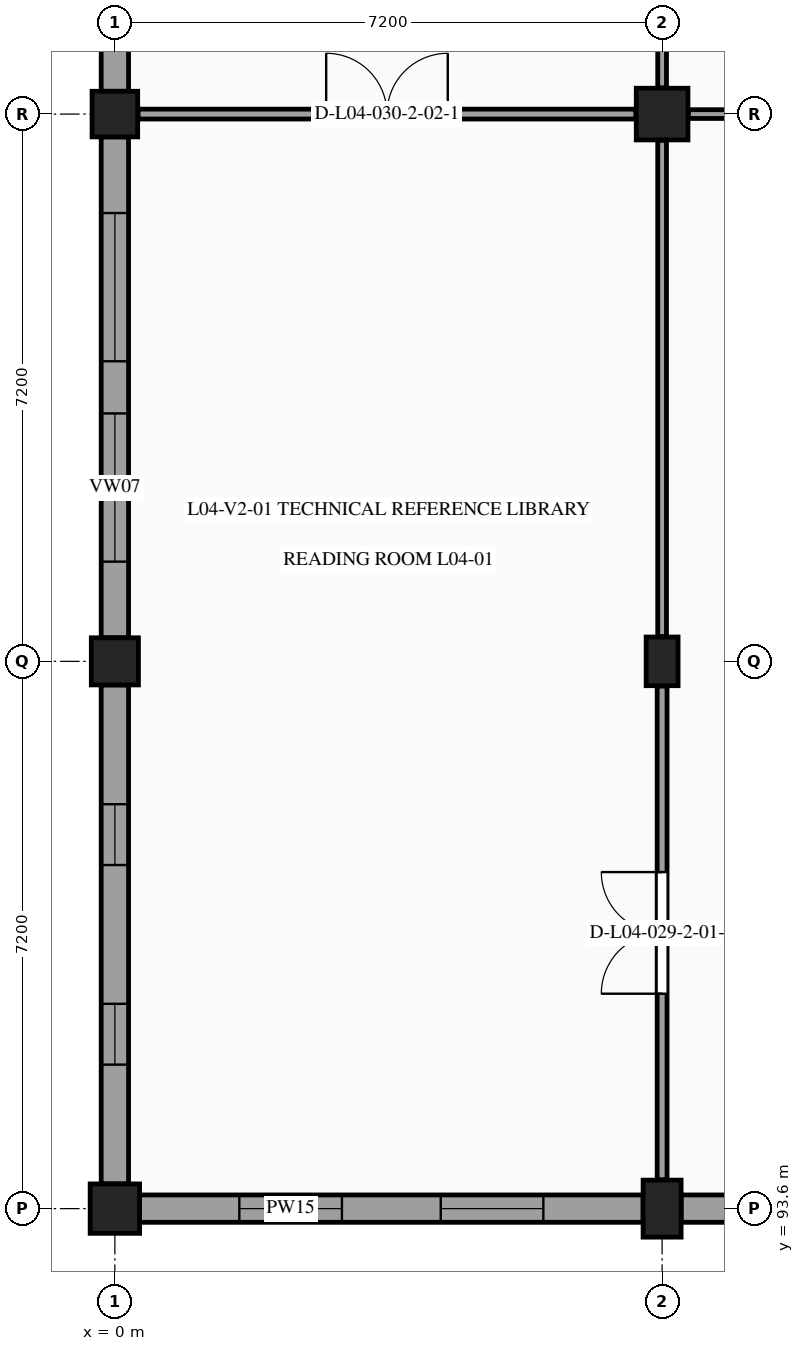
"""IFC4 building model, lengths in metres.
Left out: names, types, materials, properties, quantities, classifications, styles, units other than length and angle.
Written with IfcOpenShell. Run it as: python <this file> out.ifc"""

import sys

from ifc_helpers import new_model, si_unit, direction, frame, frame_2d, origin, origin_2d, place, context, subcontext, project, spatial, rectangle, extrude, element, fill, save


model = new_model("IFC4")
c1 = context("Model", 3, precision=1e-05, world=origin(), true_north=direction((0.0, 1.0)))
c2 = subcontext(c1, "Body", "Model", "MODEL_VIEW")
j1 = project(units=[si_unit("LENGTHUNIT", "METRE"), si_unit("PLANEANGLEUNIT", "RADIAN")], contexts=[c1])
p1 = place(None, origin())
s1 = spatial("IfcSite", under=j1, at=p1, CompositionType="ELEMENT")
p2 = place(p1, origin())
s2 = spatial("IfcBuilding", under=s1, at=p2, CompositionType="ELEMENT")
p3 = place(p2, frame((0.0, 0.0, 18.6)))
s3 = spatial("IfcBuildingStorey", under=s2, at=p3, CompositionType="ELEMENT", Elevation=18.6)
p4 = place(p3, frame((0.0, 93.6, 0.0), z_axis=(0.0, 0.0, 1.0), x_axis=(1.0, 0.0, 0.0)))
e1 = element("IfcColumn", 1, at=p4, inside=s3, PredefinedType="COLUMN", context=c2, shape_type="SweptSolid", body=[
    extrude(rectangle(XDim=0.65, YDim=0.65, at=origin_2d()), origin(), (0.0, 0.0, 1.0), 4.2),
])
p5 = place(p3, frame((0.0, 100.8, 0.0), z_axis=(0.0, 0.0, 1.0), x_axis=(1.0, 0.0, 0.0)))
e2 = element("IfcColumn", 2, at=p5, inside=s3, PredefinedType="COLUMN", context=c2, shape_type="SweptSolid", body=[
    extrude(rectangle(XDim=0.62, YDim=0.62, at=origin_2d()), origin(), (0.0, 0.0, 1.0), 4.2),
])
p6 = place(p3, frame((0.0, 108.0, 0.0), z_axis=(0.0, 0.0, 1.0), x_axis=(1.0, 0.0, 0.0)))
e3 = element("IfcColumn", 3, at=p6, inside=s3, PredefinedType="COLUMN", context=c2, shape_type="SweptSolid", body=[
    extrude(rectangle(XDim=0.6, YDim=0.6, at=origin_2d()), origin(), (0.0, 0.0, 1.0), 4.2),
])
p7 = place(p3, frame((7.2, 93.6, 0.0), z_axis=(0.0, 0.0, 1.0), x_axis=(1.0, 0.0, 0.0)))
e4 = element("IfcColumn", 4, at=p7, inside=s3, PredefinedType="COLUMN", context=c2, shape_type="SweptSolid", body=[
    extrude(rectangle(XDim=0.5, YDim=0.75, at=origin_2d()), origin(), (0.0, 0.0, 1.0), 4.2),
])
p8 = place(p3, frame((7.2, 100.8, 0.0), z_axis=(0.0, 0.0, 1.0), x_axis=(1.0, 0.0, 0.0)))
e5 = element("IfcColumn", 5, at=p8, inside=s3, PredefinedType="PILASTER", context=c2, shape_type="SweptSolid", body=[
    extrude(rectangle(XDim=0.42, YDim=0.64, at=origin_2d()), origin(), (0.0, 0.0, 1.0), 4.2),
])
p9 = place(p3, frame((7.2, 108.0, 0.0), z_axis=(0.0, 0.0, 1.0), x_axis=(1.0, 0.0, 0.0)))
e6 = element("IfcColumn", 6, at=p9, inside=s3, PredefinedType="COLUMN", context=c2, shape_type="SweptSolid", body=[
    extrude(rectangle(XDim=0.68, YDim=0.68, at=origin_2d()), origin(), (0.0, 0.0, 1.0), 4.2),
])
p10 = place(p3, frame((14.075, 93.6, 0.0), z_axis=(0.0, 0.0, 1.0), x_axis=(-1.0, 0.0, 0.0)))
e7 = element("IfcWall", 7, at=p10, inside=s3, PredefinedType="STANDARD", context=c2, shape_type="SweptSolid", body=[
    extrude(rectangle(XDim=6.625, YDim=0.36, at=frame_2d((3.312, 0.0))), origin(), (0.0, 0.0, 1.0), 3.2),
])
p11 = place(p10, frame((1.238, 0.0, 1.15)))
e8 = element("IfcOpeningElement", 8, at=p11, cuts=e7, PredefinedType="OPENING", context=c2, shape_type="SweptSolid", body=[
    extrude(rectangle(XDim=1.5, YDim=1.2, at=frame_2d((0.75, 0.6))), frame((0.0, 0.19, 0.0), z_axis=(0.0, -1.0, 0.0), x_axis=(1.0, 0.0, 0.0)), (0.0, 0.0, 1.0), 0.38),
])
p12 = place(p10, frame((3.887, 0.0, 1.15)))
e9 = element("IfcOpeningElement", 9, at=p12, cuts=e7, PredefinedType="OPENING", context=c2, shape_type="SweptSolid", body=[
    extrude(rectangle(XDim=1.5, YDim=1.2, at=frame_2d((0.75, 0.6))), frame((0.0, 0.19, 0.0), z_axis=(0.0, -1.0, 0.0), x_axis=(1.0, 0.0, 0.0)), (0.0, 0.0, 1.0), 0.38),
])
p13 = place(p3, frame((6.95, 93.6, 0.0), z_axis=(0.0, 0.0, 1.0), x_axis=(-1.0, 0.0, 0.0)))
e10 = element("IfcWall", 10, at=p13, inside=s3, PredefinedType="STANDARD", context=c2, shape_type="SweptSolid", body=[
    extrude(rectangle(XDim=6.625, YDim=0.36, at=frame_2d((3.312, 0.0))), origin(), (0.0, 0.0, 1.0), 3.2),
])
p14 = place(p13, frame((1.312, 0.0, 1.15)))
e11 = element("IfcOpeningElement", 11, at=p14, cuts=e10, PredefinedType="OPENING", context=c2, shape_type="SweptSolid", body=[
    extrude(rectangle(XDim=1.35, YDim=1.1, at=frame_2d((0.675, 0.55))), frame((0.0, 0.19, 0.0), z_axis=(0.0, -1.0, 0.0), x_axis=(1.0, 0.0, 0.0)), (0.0, 0.0, 1.0), 0.38),
])
p15 = place(p13, frame((3.962, 0.0, 1.15)))
e12 = element("IfcOpeningElement", 12, at=p15, cuts=e10, PredefinedType="OPENING", context=c2, shape_type="SweptSolid", body=[
    extrude(rectangle(XDim=1.35, YDim=1.1, at=frame_2d((0.675, 0.55))), frame((0.0, 0.19, 0.0), z_axis=(0.0, -1.0, 0.0), x_axis=(1.0, 0.0, 0.0)), (0.0, 0.0, 1.0), 0.38),
])
p16 = place(p3, frame((0.0, 93.925, 0.0), z_axis=(0.0, 0.0, 1.0), x_axis=(0.0, 1.0, 0.0)))
e13 = element("IfcWall", 13, at=p16, inside=s3, PredefinedType="STANDARD", context=c2, shape_type="SweptSolid", body=[
    extrude(rectangle(XDim=6.565, YDim=0.36, at=frame_2d((3.282, 0.0))), origin(), (0.0, 0.0, 1.0), 3.15),
])
p17 = place(p16, frame((1.57, 0.0, 1.15)))
e14 = element("IfcOpeningElement", 14, at=p17, cuts=e13, PredefinedType="OPENING", context=c2, shape_type="SweptSolid", body=[
    extrude(rectangle(XDim=0.8, YDim=1.5, at=frame_2d((0.4, 0.75))), frame((0.0, 0.19, 0.0), z_axis=(0.0, -1.0, 0.0), x_axis=(1.0, 0.0, 0.0)), (0.0, 0.0, 1.0), 0.38),
])
p18 = place(p16, frame((4.196, 0.0, 1.15)))
e15 = element("IfcOpeningElement", 15, at=p18, cuts=e13, PredefinedType="OPENING", context=c2, shape_type="SweptSolid", body=[
    extrude(rectangle(XDim=0.8, YDim=1.5, at=frame_2d((0.4, 0.75))), frame((0.0, 0.19, 0.0), z_axis=(0.0, -1.0, 0.0), x_axis=(1.0, 0.0, 0.0)), (0.0, 0.0, 1.0), 0.38),
])
p19 = place(p3, frame((0.0, 101.11, 0.0), z_axis=(0.0, 0.0, 1.0), x_axis=(0.0, 1.0, 0.0)))
e16 = element("IfcWall", 16, at=p19, inside=s3, PredefinedType="STANDARD", context=c2, shape_type="SweptSolid", body=[
    extrude(rectangle(XDim=6.59, YDim=0.36, at=frame_2d((3.295, 0.0))), origin(), (0.0, 0.0, 1.0), 3.15),
])
p20 = place(p19, frame((1.002, 0.0, 1.15)))
e17 = element("IfcOpeningElement", 17, at=p20, cuts=e16, PredefinedType="OPENING", context=c2, shape_type="SweptSolid", body=[
    extrude(rectangle(XDim=1.95, YDim=1.4, at=frame_2d((0.975, 0.7))), frame((0.0, 0.19, 0.0), z_axis=(0.0, -1.0, 0.0), x_axis=(1.0, 0.0, 0.0)), (0.0, 0.0, 1.0), 0.38),
])
p21 = place(p19, frame((3.638, 0.0, 1.15)))
e18 = element("IfcOpeningElement", 18, at=p21, cuts=e16, PredefinedType="OPENING", context=c2, shape_type="SweptSolid", body=[
    extrude(rectangle(XDim=1.95, YDim=1.4, at=frame_2d((0.975, 0.7))), frame((0.0, 0.19, 0.0), z_axis=(0.0, -1.0, 0.0), x_axis=(1.0, 0.0, 0.0)), (0.0, 0.0, 1.0), 0.38),
])
p22 = place(p3, frame((0.0, 108.3, 0.0), z_axis=(0.0, 0.0, 1.0), x_axis=(0.0, 1.0, 0.0)))
e19 = element("IfcWall", 19, at=p22, inside=s3, PredefinedType="STANDARD", context=c2, shape_type="SweptSolid", body=[
    extrude(rectangle(XDim=6.525, YDim=0.36, at=frame_2d((3.262, 0.0))), origin(), (0.0, 0.0, 1.0), 3.15),
])
p23 = place(p22, frame((1.083, 0.0, 1.15)))
e20 = element("IfcOpeningElement", 20, at=p23, cuts=e19, PredefinedType="OPENING", context=c2, shape_type="SweptSolid", body=[
    extrude(rectangle(XDim=1.75, YDim=1.4, at=frame_2d((0.875, 0.7))), frame((0.0, 0.19, 0.0), z_axis=(0.0, -1.0, 0.0), x_axis=(1.0, 0.0, 0.0)), (0.0, 0.0, 1.0), 0.38),
])
p24 = place(p22, frame((3.692, 0.0, 1.15)))
e21 = element("IfcOpeningElement", 21, at=p24, cuts=e19, PredefinedType="OPENING", context=c2, shape_type="SweptSolid", body=[
    extrude(rectangle(XDim=1.75, YDim=1.4, at=frame_2d((0.875, 0.7))), frame((0.0, 0.19, 0.0), z_axis=(0.0, -1.0, 0.0), x_axis=(1.0, 0.0, 0.0)), (0.0, 0.0, 1.0), 0.38),
])
p25 = place(p3, frame((7.2, 93.98, 0.0), z_axis=(0.0, 0.0, 1.0), x_axis=(0.0, 1.0, 0.0)))
e22 = element("IfcWall", 22, at=p25, inside=s3, PredefinedType="PARTITIONING", context=c2, shape_type="SweptSolid", body=[
    extrude(rectangle(XDim=6.495, YDim=0.13, at=frame_2d((3.248, 0.0))), origin(), (0.0, 0.0, 1.0), 3.265),
])
p26 = place(p25, frame((2.448, 0.0, 0.0)))
e23 = element("IfcOpeningElement", 23, at=p26, cuts=e22, PredefinedType="OPENING", context=c2, shape_type="SweptSolid", body=[
    extrude(rectangle(XDim=1.6, YDim=2.2, at=frame_2d((0.8, 1.1))), frame((0.0, 0.075, 0.0), z_axis=(0.0, -1.0, 0.0), x_axis=(1.0, 0.0, 0.0)), (0.0, 0.0, 1.0), 0.15),
])
p27 = place(p3, frame((7.2, 101.125, 0.0), z_axis=(0.0, 0.0, 1.0), x_axis=(0.0, 1.0, 0.0)))
e24 = element("IfcWall", 24, at=p27, inside=s3, PredefinedType="PARTITIONING", context=c2, shape_type="SweptSolid", body=[
    extrude(rectangle(XDim=6.53, YDim=0.115, at=frame_2d((3.265, 0.0))), origin(), (0.0, 0.0, 1.0), 3.26),
])
p28 = place(p3, frame((0.305, 108.0, 0.0), z_axis=(0.0, 0.0, 1.0), x_axis=(1.0, 0.0, 0.0)))
e25 = element("IfcWall", 25, at=p28, inside=s3, PredefinedType="PARTITIONING", context=c2, shape_type="SweptSolid", body=[
    extrude(rectangle(XDim=6.55, YDim=0.13, at=frame_2d((3.275, 0.0))), origin(), (0.0, 0.0, 1.0), 3.235),
])
p29 = place(p28, frame((2.475, 0.0, 0.0)))
e26 = element("IfcOpeningElement", 26, at=p29, cuts=e25, PredefinedType="OPENING", context=c2, shape_type="SweptSolid", body=[
    extrude(rectangle(XDim=1.6, YDim=2.2, at=frame_2d((0.8, 1.1))), frame((0.0, 0.075, 0.0), z_axis=(0.0, -1.0, 0.0), x_axis=(1.0, 0.0, 0.0)), (0.0, 0.0, 1.0), 0.15),
])
p30 = place(p3, frame((7.2, 108.345, 0.0), z_axis=(0.0, 0.0, 1.0), x_axis=(0.0, 1.0, 0.0)))
e27 = element("IfcWall", 27, at=p30, inside=s3, PredefinedType="PARTITIONING", context=c2, shape_type="SweptSolid", body=[
    extrude(rectangle(XDim=6.525, YDim=0.115, at=frame_2d((3.263, 0.0))), origin(), (0.0, 0.0, 1.0), 3.26),
])
p31 = place(p3, frame((7.545, 108.0, 0.0), z_axis=(0.0, 0.0, 1.0), x_axis=(1.0, 0.0, 0.0)))
e28 = element("IfcWall", 28, at=p31, inside=s3, PredefinedType="PARTITIONING", context=c2, shape_type="SweptSolid", body=[
    extrude(rectangle(XDim=6.55, YDim=0.115, at=frame_2d((3.275, 0.0))), origin(), (0.0, 0.0, 1.0), 3.255),
])
p32 = place(p31, frame((2.535, 0.0, 0.0)))
e29 = element("IfcOpeningElement", 29, at=p32, cuts=e28, PredefinedType="OPENING", context=c2, shape_type="SweptSolid", body=[
    extrude(rectangle(XDim=1.48, YDim=2.28, at=frame_2d((0.74, 1.14))), frame((0.0, 0.067, 0.0), z_axis=(0.0, -1.0, 0.0), x_axis=(1.0, 0.0, 0.0)), (0.0, 0.0, 1.0), 0.135),
])
p33 = place(p14, origin())
e30 = element("IfcWindow", 30, at=p33, inside=s3, PartitioningType="SINGLE_PANEL", PredefinedType="WINDOW", context=c2, shape_type="SweptSolid", body=[
    extrude(rectangle(XDim=1.35, YDim=1.1, at=frame_2d((0.675, 0.55))), frame((0.0, -0.08, 0.0), z_axis=(0.0, -1.0, 0.0), x_axis=(1.0, 0.0, 0.0)), (0.0, 0.0, 1.0), 0.06),
])
fill(e11, e30)
p34 = place(p15, origin())
e31 = element("IfcWindow", 31, at=p34, inside=s3, PartitioningType="SINGLE_PANEL", PredefinedType="WINDOW", context=c2, shape_type="SweptSolid", body=[
    extrude(rectangle(XDim=1.35, YDim=1.1, at=frame_2d((0.675, 0.55))), frame((0.0, -0.08, 0.0), z_axis=(0.0, -1.0, 0.0), x_axis=(1.0, 0.0, 0.0)), (0.0, 0.0, 1.0), 0.06),
])
fill(e12, e31)
p35 = place(p17, origin())
e32 = element("IfcWindow", 32, at=p35, inside=s3, PartitioningType="SINGLE_PANEL", PredefinedType="WINDOW", context=c2, shape_type="SweptSolid", body=[
    extrude(rectangle(XDim=0.8, YDim=1.5, at=frame_2d((0.4, 0.75))), frame((0.0, -0.08, 0.0), z_axis=(0.0, -1.0, 0.0), x_axis=(1.0, 0.0, 0.0)), (0.0, 0.0, 1.0), 0.06),
])
fill(e14, e32)
p36 = place(p18, origin())
e33 = element("IfcWindow", 33, at=p36, inside=s3, PartitioningType="SINGLE_PANEL", PredefinedType="WINDOW", context=c2, shape_type="SweptSolid", body=[
    extrude(rectangle(XDim=0.8, YDim=1.5, at=frame_2d((0.4, 0.75))), frame((0.0, -0.08, 0.0), z_axis=(0.0, -1.0, 0.0), x_axis=(1.0, 0.0, 0.0)), (0.0, 0.0, 1.0), 0.06),
])
fill(e15, e33)
p37 = place(p20, origin())
e34 = element("IfcWindow", 34, at=p37, inside=s3, PartitioningType="SINGLE_PANEL", PredefinedType="WINDOW", context=c2, shape_type="SweptSolid", body=[
    extrude(rectangle(XDim=1.95, YDim=1.4, at=frame_2d((0.975, 0.7))), frame((0.0, -0.08, 0.0), z_axis=(0.0, -1.0, 0.0), x_axis=(1.0, 0.0, 0.0)), (0.0, 0.0, 1.0), 0.06),
])
fill(e17, e34)
p38 = place(p21, origin())
e35 = element("IfcWindow", 35, at=p38, inside=s3, PartitioningType="SINGLE_PANEL", PredefinedType="WINDOW", context=c2, shape_type="SweptSolid", body=[
    extrude(rectangle(XDim=1.95, YDim=1.4, at=frame_2d((0.975, 0.7))), frame((0.0, -0.08, 0.0), z_axis=(0.0, -1.0, 0.0), x_axis=(1.0, 0.0, 0.0)), (0.0, 0.0, 1.0), 0.06),
])
fill(e18, e35)
p39 = place(p26, origin())
e36 = element("IfcDoor", 36, at=p39, inside=s3, OperationType="DOUBLE_DOOR_SINGLE_SWING", PredefinedType="DOOR", context=c2, shape_type="SweptSolid", body=[
    extrude(rectangle(XDim=1.6, YDim=2.2, at=frame_2d((0.8, 1.1))), frame((0.0, 0.025, 0.0), z_axis=(0.0, -1.0, 0.0), x_axis=(1.0, 0.0, 0.0)), (0.0, 0.0, 1.0), 0.05),
])
fill(e23, e36)
p40 = place(p29, origin())
e37 = element("IfcDoor", 37, at=p40, inside=s3, OperationType="DOUBLE_DOOR_SINGLE_SWING", PredefinedType="DOOR", context=c2, shape_type="SweptSolid", body=[
    extrude(rectangle(XDim=1.6, YDim=2.2, at=frame_2d((0.8, 1.1))), frame((0.0, 0.025, 0.0), z_axis=(0.0, -1.0, 0.0), x_axis=(1.0, 0.0, 0.0)), (0.0, 0.0, 1.0), 0.05),
])
fill(e26, e37)
save(model, sys.argv[1])
